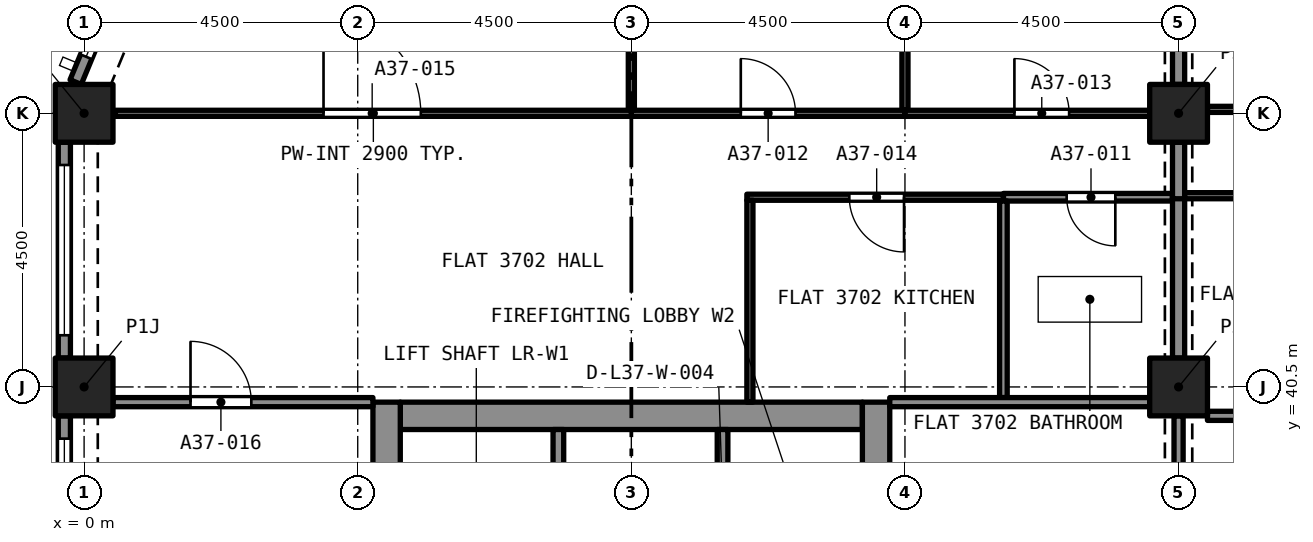
"""IFC4 building model, lengths in metres.
Left out: names, types, materials, properties, quantities, classifications, styles, units other than length and angle.
Written with IfcOpenShell. Run it as: python <this file> out.ifc"""

import sys

from ifc_helpers import new_model, si_unit, direction, frame, frame_2d, origin, origin_2d, place, context, subcontext, project, spatial, rectangle, extrude, element, fill, save


model = new_model("IFC4")
c1 = context("Model", 3, precision=1e-05, world=origin(), true_north=direction((0.0, 1.0)))
c2 = subcontext(c1, "Body", "Model", "MODEL_VIEW")
j1 = project(units=[si_unit("LENGTHUNIT", "METRE"), si_unit("PLANEANGLEUNIT", "RADIAN")], contexts=[c1])
p1 = place(None, origin())
s1 = spatial("IfcSite", under=j1, at=p1, CompositionType="ELEMENT")
p2 = place(p1, origin())
s2 = spatial("IfcBuilding", under=s1, at=p2, CompositionType="ELEMENT")
p3 = place(p2, frame((0.0, 0.0, 133.4)))
s3 = spatial("IfcBuildingStorey", under=s2, at=p3, CompositionType="ELEMENT", Elevation=133.4)
for number, where, z_axis, x_axis in (
    (1, (0.0, 40.5, 0.0), (0.0, 0.0, 1.0), (1.0, 0.0, 0.0)),
    (2, (18.0, 40.5, 0.0), (0.0, 0.0, 1.0), (1.0, 0.0, 0.0)),
    (3, (0.0, 45.0, 0.0), (0.0, 0.0, 1.0), (1.0, 0.0, 0.0)),
    (4, (18.0, 45.0, 0.0), (0.0, 0.0, 1.0), (1.0, 0.0, 0.0)),
):
    element("IfcColumn", number, at=place(p3, frame(where, z_axis=z_axis, x_axis=x_axis)), inside=s3, PredefinedType="COLUMN", context=c2, shape_type="SweptSolid", body=[
        extrude(rectangle(XDim=0.95, YDim=0.95, at=origin_2d()), origin(), (0.0, 0.0, 1.0), 3.2),
    ])
p4 = place(p3, frame((5.2, 40.025, 0.0), z_axis=(0.0, 0.0, 1.0), x_axis=(1.0, 0.0, 0.0)))
e5 = element("IfcWall", 5, at=p4, inside=s3, PredefinedType="SOLIDWALL", context=c2, shape_type="SweptSolid", body=[
    extrude(rectangle(XDim=7.6, YDim=0.45, at=frame_2d((3.8, 0.0))), origin(), (0.0, 0.0, 1.0), 3.2),
])
p5 = place(p3, frame((4.975, 27.25, 0.0), z_axis=(0.0, 0.0, 1.0), x_axis=(0.0, 1.0, 0.0)))
e6 = element("IfcWall", 6, at=p5, inside=s3, PredefinedType="SOLIDWALL", context=c2, shape_type="SweptSolid", body=[
    extrude(rectangle(XDim=13.0, YDim=0.45, at=frame_2d((6.5, 0.0))), origin(), (0.0, 0.0, 1.0), 3.2),
])
p6 = place(p5, frame((8.7, 0.0, 0.0)))
e7 = element("IfcOpeningElement", 7, at=p6, cuts=e6, PredefinedType="OPENING", context=c2, shape_type="SweptSolid", body=[
    extrude(rectangle(XDim=1.2, YDim=2.1, at=frame_2d((0.6, 1.05))), frame((0.0, 0.235, 0.0), z_axis=(0.0, -1.0, 0.0), x_axis=(1.0, 0.0, 0.0)), (0.0, 0.0, 1.0), 0.47),
])
p7 = place(p3, frame((13.025, 27.25, 0.0), z_axis=(0.0, 0.0, 1.0), x_axis=(0.0, 1.0, 0.0)))
e8 = element("IfcWall", 8, at=p7, inside=s3, PredefinedType="SOLIDWALL", context=c2, shape_type="SweptSolid", body=[
    extrude(rectangle(XDim=13.0, YDim=0.45, at=frame_2d((6.5, 0.0))), origin(), (0.0, 0.0, 1.0), 3.2),
])
p8 = place(p7, frame((10.85, 0.0, 0.0)))
e9 = element("IfcOpeningElement", 9, at=p8, cuts=e8, PredefinedType="OPENING", context=c2, shape_type="SweptSolid", body=[
    extrude(rectangle(XDim=1.1, YDim=2.1, at=frame_2d((0.55, 1.05))), frame((0.0, 0.235, 0.0), z_axis=(0.0, -1.0, 0.0), x_axis=(1.0, 0.0, 0.0)), (0.0, 0.0, 1.0), 0.47),
])
p9 = place(p7, frame((8.7, 0.0, 0.0)))
e10 = element("IfcOpeningElement", 10, at=p9, cuts=e8, PredefinedType="OPENING", context=c2, shape_type="SweptSolid", body=[
    extrude(rectangle(XDim=1.2, YDim=2.1, at=frame_2d((0.6, 1.05))), frame((0.0, 0.235, 0.0), z_axis=(0.0, -1.0, 0.0), x_axis=(1.0, 0.0, 0.0)), (0.0, 0.0, 1.0), 0.47),
])
p10 = place(p3, frame((-0.139, 45.513, 0.0), z_axis=(0.0, 0.0, 1.0), x_axis=(0.382680855588, 0.923880599843, 0.0)))
e11 = element("IfcWall", 11, at=p10, inside=s3, PredefinedType="SOLIDWALL", context=c2, shape_type="SweptSolid", body=[
    extrude(rectangle(XDim=2.403, YDim=0.2, at=frame_2d((1.201, 0.0))), origin(), (0.0, 0.0, 1.0), 3.2),
])
p11 = place(p10, frame((0.451, 0.0, 0.45)))
e12 = element("IfcOpeningElement", 12, at=p11, cuts=e11, PredefinedType="OPENING", context=c2, shape_type="SweptSolid", body=[
    extrude(rectangle(XDim=1.7, YDim=1.95, at=frame_2d((0.85, 0.975))), frame((0.0, 0.11, 0.0), z_axis=(0.0, -1.0, 0.0), x_axis=(1.0, 0.0, 0.0)), (0.0, 0.0, 1.0), 0.22),
])
p12 = place(p3, frame((-0.325, 40.975, 0.0), z_axis=(0.0, 0.0, 1.0), x_axis=(0.0, 1.0, 0.0)))
e13 = element("IfcWall", 13, at=p12, inside=s3, PredefinedType="SOLIDWALL", context=c2, shape_type="SweptSolid", body=[
    extrude(rectangle(XDim=3.55, YDim=0.2, at=frame_2d((1.775, 0.0))), origin(), (0.0, 0.0, 1.0), 3.2),
])
p13 = place(p12, frame((0.375, 0.0, 0.45)))
e14 = element("IfcOpeningElement", 14, at=p13, cuts=e13, PredefinedType="OPENING", context=c2, shape_type="SweptSolid", body=[
    extrude(rectangle(XDim=2.8, YDim=1.95, at=frame_2d((1.4, 0.975))), frame((0.0, 0.11, 0.0), z_axis=(0.0, -1.0, 0.0), x_axis=(1.0, 0.0, 0.0)), (0.0, 0.0, 1.0), 0.22),
])
p14 = place(p3, frame((-0.325, 36.475, 0.0), z_axis=(0.0, 0.0, 1.0), x_axis=(0.0, 1.0, 0.0)))
e15 = element("IfcWall", 15, at=p14, inside=s3, PredefinedType="SOLIDWALL", context=c2, shape_type="SweptSolid", body=[
    extrude(rectangle(XDim=3.55, YDim=0.2, at=frame_2d((1.775, 0.0))), origin(), (0.0, 0.0, 1.0), 3.2),
])
p15 = place(p14, frame((0.375, 0.0, 0.45)))
e16 = element("IfcOpeningElement", 16, at=p15, cuts=e15, PredefinedType="OPENING", context=c2, shape_type="SweptSolid", body=[
    extrude(rectangle(XDim=2.8, YDim=1.95, at=frame_2d((1.4, 0.975))), frame((0.0, 0.11, 0.0), z_axis=(0.0, -1.0, 0.0), x_axis=(1.0, 0.0, 0.0)), (0.0, 0.0, 1.0), 0.22),
])
p16 = place(p3, frame((17.9, 43.62, 0.0), z_axis=(0.0, 0.0, 1.0), x_axis=(-1.0, 0.0, 0.0)))
e17 = element("IfcWall", 17, at=p16, inside=s3, PredefinedType="PARTITIONING", context=c2, shape_type="SweptSolid", body=[
    extrude(rectangle(XDim=2.781, YDim=0.125, at=frame_2d((1.39, 0.0))), origin(), (0.0, 0.0, 1.0), 2.9),
])
p17 = place(p16, frame((0.94, 0.0, 0.0)))
e18 = element("IfcOpeningElement", 18, at=p17, cuts=e17, PredefinedType="OPENING", context=c2, shape_type="SweptSolid", body=[
    extrude(rectangle(XDim=0.8, YDim=2.1, at=frame_2d((0.4, 1.05))), frame((0.0, 0.073, 0.0), z_axis=(0.0, -1.0, 0.0), x_axis=(1.0, 0.0, 0.0)), (0.0, 0.0, 1.0), 0.145),
])
p18 = place(p3, frame((15.119, 40.325, 0.0), z_axis=(0.0, 0.0, 1.0), x_axis=(0.0, 1.0, 0.0)))
e19 = element("IfcWall", 19, at=p18, inside=s3, PredefinedType="PARTITIONING", context=c2, shape_type="SweptSolid", body=[
    extrude(rectangle(XDim=3.233, YDim=0.125, at=frame_2d((1.616, 0.0))), origin(), (0.0, 0.0, 1.0), 2.9),
])
p19 = place(p3, frame((18.0, 40.975, 0.0), z_axis=(0.0, 0.0, 1.0), x_axis=(0.0, 1.0, 0.0)))
e20 = element("IfcWall", 20, at=p19, inside=s3, PredefinedType="PARTITIONING", context=c2, shape_type="SweptSolid", body=[
    extrude(rectangle(XDim=2.708, YDim=0.2, at=frame_2d((1.354, 0.0))), origin(), (0.0, 0.0, 1.0), 2.38),
])
p20 = place(p3, frame((13.5, 45.05, 0.0), z_axis=(0.0, 0.0, 1.0), x_axis=(0.0, 1.0, 0.0)))
e21 = element("IfcWall", 21, at=p20, inside=s3, PredefinedType="PARTITIONING", context=c2, shape_type="SweptSolid", body=[
    extrude(rectangle(XDim=3.975, YDim=0.1, at=frame_2d((1.987, 0.0))), origin(), (0.0, 0.0, 1.0), 2.9),
])
p21 = place(p3, frame((9.0, 45.0, 0.0), z_axis=(0.0, 0.0, 1.0), x_axis=(1.0, 0.0, 0.0)))
e22 = element("IfcWall", 22, at=p21, inside=s3, PredefinedType="PARTITIONING", context=c2, shape_type="SweptSolid", body=[
    extrude(rectangle(XDim=4.5, YDim=0.1, at=frame_2d((2.25, 0.0))), origin(), (0.0, 0.0, 1.0), 2.9),
])
p22 = place(p21, frame((1.8, 0.0, 0.0)))
e23 = element("IfcOpeningElement", 23, at=p22, cuts=e22, PredefinedType="OPENING", context=c2, shape_type="SweptSolid", body=[
    extrude(rectangle(XDim=0.9, YDim=2.1, at=frame_2d((0.45, 1.05))), frame((0.0, 0.06, 0.0), z_axis=(0.0, -1.0, 0.0), x_axis=(1.0, 0.0, 0.0)), (0.0, 0.0, 1.0), 0.12),
])
p23 = place(p3, frame((9.0, 45.05, 0.0), z_axis=(0.0, 0.0, 1.0), x_axis=(0.0, 1.0, 0.0)))
e24 = element("IfcWall", 24, at=p23, inside=s3, PredefinedType="PARTITIONING", context=c2, shape_type="SweptSolid", body=[
    extrude(rectangle(XDim=3.975, YDim=0.1, at=frame_2d((1.987, 0.0))), origin(), (0.0, 0.0, 1.0), 2.9),
])
p24 = place(p3, frame((13.5, 45.0, 0.0), z_axis=(0.0, 0.0, 1.0), x_axis=(1.0, 0.0, 0.0)))
e25 = element("IfcWall", 25, at=p24, inside=s3, PredefinedType="PARTITIONING", context=c2, shape_type="SweptSolid", body=[
    extrude(rectangle(XDim=4.025, YDim=0.1, at=frame_2d((2.012, 0.0))), origin(), (0.0, 0.0, 1.0), 2.9),
])
p25 = place(p24, frame((1.8, 0.0, 0.0)))
e26 = element("IfcOpeningElement", 26, at=p25, cuts=e25, PredefinedType="OPENING", context=c2, shape_type="SweptSolid", body=[
    extrude(rectangle(XDim=0.9, YDim=2.1, at=frame_2d((0.45, 1.05))), frame((0.0, 0.06, 0.0), z_axis=(0.0, -1.0, 0.0), x_axis=(1.0, 0.0, 0.0)), (0.0, 0.0, 1.0), 0.12),
])
p26 = place(p3, frame((18.0, 45.475, 0.0), z_axis=(0.0, 0.0, 1.0), x_axis=(0.0, 1.0, 0.0)))
e27 = element("IfcWall", 27, at=p26, inside=s3, PredefinedType="PARTITIONING", context=c2, shape_type="SweptSolid", body=[
    extrude(rectangle(XDim=3.55, YDim=0.2, at=frame_2d((1.775, 0.0))), origin(), (0.0, 0.0, 1.0), 2.38),
])
p27 = place(p3, frame((15.119, 43.62, 0.0), z_axis=(0.0, 0.0, 1.0), x_axis=(-1.0, 0.0, 0.0)))
e28 = element("IfcWall", 28, at=p27, inside=s3, PredefinedType="PARTITIONING", context=c2, shape_type="SweptSolid", body=[
    extrude(rectangle(XDim=4.219, YDim=0.1, at=frame_2d((2.11, 0.0))), origin(), (0.0, 0.0, 1.0), 2.9),
])
p28 = place(p27, frame((1.635, 0.0, 0.0)))
e29 = element("IfcOpeningElement", 29, at=p28, cuts=e28, PredefinedType="OPENING", context=c2, shape_type="SweptSolid", body=[
    extrude(rectangle(XDim=0.9, YDim=2.1, at=frame_2d((0.45, 1.05))), frame((0.0, 0.06, 0.0), z_axis=(0.0, -1.0, 0.0), x_axis=(1.0, 0.0, 0.0)), (0.0, 0.0, 1.0), 0.12),
])
p29 = place(p3, frame((10.95, 40.25, 0.0), z_axis=(0.0, 0.0, 1.0), x_axis=(0.0, 1.0, 0.0)))
e30 = element("IfcWall", 30, at=p29, inside=s3, PredefinedType="PARTITIONING", context=c2, shape_type="SweptSolid", body=[
    extrude(rectangle(XDim=3.32, YDim=0.1, at=frame_2d((1.66, 0.0))), origin(), (0.0, 0.0, 1.0), 2.9),
])
p30 = place(p3, frame((0.514, 45.0, 0.0), z_axis=(0.0, 0.0, 1.0), x_axis=(1.0, 0.0, 0.0)))
e31 = element("IfcWall", 31, at=p30, inside=s3, PredefinedType="PARTITIONING", context=c2, shape_type="SweptSolid", body=[
    extrude(rectangle(XDim=8.486, YDim=0.1, at=frame_2d((4.243, 0.0))), origin(), (0.0, 0.0, 1.0), 2.9),
])
p31 = place(p30, frame((3.423, 0.0, 0.0)))
e32 = element("IfcOpeningElement", 32, at=p31, cuts=e31, PredefinedType="OPENING", context=c2, shape_type="SweptSolid", body=[
    extrude(rectangle(XDim=1.6, YDim=2.1, at=frame_2d((0.8, 1.05))), frame((0.0, 0.06, 0.0), z_axis=(0.0, -1.0, 0.0), x_axis=(1.0, 0.0, 0.0)), (0.0, 0.0, 1.0), 0.12),
])
p32 = place(p3, frame((18.0, 43.595, 0.0), z_axis=(0.0, 0.0, 1.0), x_axis=(0.0, 1.0, 0.0)))
e33 = element("IfcWall", 33, at=p32, inside=s3, PredefinedType="PARTITIONING", context=c2, shape_type="SweptSolid", body=[
    extrude(rectangle(XDim=0.93, YDim=0.2, at=frame_2d((0.465, 0.0))), origin(), (0.0, 0.0, 1.0), 2.38),
])
p33 = place(p3, frame((0.475, 40.25, 0.0), z_axis=(0.0, 0.0, 1.0), x_axis=(1.0, 0.0, 0.0)))
e34 = element("IfcWall", 34, at=p33, inside=s3, PredefinedType="PARTITIONING", context=c2, shape_type="SweptSolid", body=[
    extrude(rectangle(XDim=4.275, YDim=0.15, at=frame_2d((2.137, 0.0))), origin(), (0.0, 0.0, 1.0), 2.9),
])
p34 = place(p33, frame((1.275, 0.0, 0.0)))
e35 = element("IfcOpeningElement", 35, at=p34, cuts=e34, PredefinedType="OPENING", context=c2, shape_type="SweptSolid", body=[
    extrude(rectangle(XDim=1.0, YDim=2.1, at=frame_2d((0.5, 1.05))), frame((0.0, 0.085, 0.0), z_axis=(0.0, -1.0, 0.0), x_axis=(1.0, 0.0, 0.0)), (0.0, 0.0, 1.0), 0.17),
])
p35 = place(p3, frame((13.25, 40.25, 0.0), z_axis=(0.0, 0.0, 1.0), x_axis=(1.0, 0.0, 0.0)))
e36 = element("IfcWall", 36, at=p35, inside=s3, PredefinedType="PARTITIONING", context=c2, shape_type="SweptSolid", body=[
    extrude(rectangle(XDim=4.275, YDim=0.15, at=frame_2d((2.137, 0.0))), origin(), (0.0, 0.0, 1.0), 2.9),
])
p36 = place(p3, frame((21.24, 43.645, 0.0), z_axis=(0.0, 0.0, 1.0), x_axis=(-1.0, 0.0, 0.0)))
e37 = element("IfcWall", 37, at=p36, inside=s3, PredefinedType="PARTITIONING", context=c2, shape_type="SweptSolid", body=[
    extrude(rectangle(XDim=3.14, YDim=0.1, at=frame_2d((1.57, 0.0))), origin(), (0.0, 0.0, 1.0), 2.75),
])
p37 = place(p36, frame((1.17, 0.0, 0.0)))
e38 = element("IfcOpeningElement", 38, at=p37, cuts=e37, PredefinedType="OPENING", context=c2, shape_type="SweptSolid", body=[
    extrude(rectangle(XDim=0.9, YDim=2.1, at=frame_2d((0.45, 1.05))), frame((0.0, 0.06, 0.0), z_axis=(0.0, -1.0, 0.0), x_axis=(1.0, 0.0, 0.0)), (0.0, 0.0, 1.0), 0.12),
])
p38 = place(p3, frame((18.475, 45.065, 0.0), z_axis=(0.0, 0.0, 1.0), x_axis=(1.0, 0.0, 0.0)))
e39 = element("IfcWall", 39, at=p38, inside=s3, PredefinedType="PARTITIONING", context=c2, shape_type="SweptSolid", body=[
    extrude(rectangle(XDim=4.025, YDim=0.1, at=frame_2d((2.012, 0.0))), origin(), (0.0, 0.0, 1.0), 2.75),
])
p39 = place(p38, frame((1.275, 0.0, 0.0)))
e40 = element("IfcOpeningElement", 40, at=p39, cuts=e39, PredefinedType="OPENING", context=c2, shape_type="SweptSolid", body=[
    extrude(rectangle(XDim=1.0, YDim=2.1, at=frame_2d((0.5, 1.05))), frame((0.0, 0.06, 0.0), z_axis=(0.0, -1.0, 0.0), x_axis=(1.0, 0.0, 0.0)), (0.0, 0.0, 1.0), 0.12),
])
p40 = place(p3, frame((18.475, 40.025, 0.0), z_axis=(0.0, 0.0, 1.0), x_axis=(1.0, 0.0, 0.0)))
e41 = element("IfcWall", 41, at=p40, inside=s3, PredefinedType="PARTITIONING", context=c2, shape_type="SweptSolid", body=[
    extrude(rectangle(XDim=9.05, YDim=0.15, at=frame_2d((4.525, 0.0))), origin(), (0.0, 0.0, 1.0), 2.75),
])
p41 = place(p3, frame((18.0, 40.025, 0.0), z_axis=(0.0, 0.0, 1.0), x_axis=(0.0, -1.0, 0.0)))
e42 = element("IfcWall", 42, at=p41, inside=s3, PredefinedType="PARTITIONING", context=c2, shape_type="SweptSolid", body=[
    extrude(rectangle(XDim=3.55, YDim=0.15, at=frame_2d((1.775, 0.0))), origin(), (0.0, 0.0, 1.0), 2.38),
])
p42 = place(p41, frame((1.175, 0.0, 0.0)))
e43 = element("IfcOpeningElement", 43, at=p42, cuts=e42, PredefinedType="OPENING", context=c2, shape_type="SweptSolid", body=[
    extrude(rectangle(XDim=1.2, YDim=2.1, at=frame_2d((0.6, 1.05))), frame((0.0, 0.085, 0.0), z_axis=(0.0, -1.0, 0.0), x_axis=(1.0, 0.0, 0.0)), (0.0, 0.0, 1.0), 0.17),
])
p43 = place(p3, frame((7.8, 37.5, 0.0), z_axis=(0.0, 0.0, 1.0), x_axis=(0.0, 1.0, 0.0)))
e44 = element("IfcWall", 44, at=p43, inside=s3, PredefinedType="SOLIDWALL", context=c2, shape_type="SweptSolid", body=[
    extrude(rectangle(XDim=2.3, YDim=0.175, at=frame_2d((1.15, 0.0))), origin(), (0.0, 0.0, 1.0), 2.9),
])
p44 = place(p3, frame((10.5, 37.5, 0.0), z_axis=(0.0, 0.0, 1.0), x_axis=(0.0, 1.0, 0.0)))
e45 = element("IfcWall", 45, at=p44, inside=s3, PredefinedType="SOLIDWALL", context=c2, shape_type="SweptSolid", body=[
    extrude(rectangle(XDim=2.3, YDim=0.175, at=frame_2d((1.15, 0.0))), origin(), (0.0, 0.0, 1.0), 2.9),
])
p45 = place(p44, frame((0.65, 0.0, 0.0)))
e46 = element("IfcOpeningElement", 46, at=p45, cuts=e45, PredefinedType="OPENING", context=c2, shape_type="SweptSolid", body=[
    extrude(rectangle(XDim=1.0, YDim=2.1, at=frame_2d((0.5, 1.05))), frame((0.0, 0.097, 0.0), z_axis=(0.0, -1.0, 0.0), x_axis=(1.0, 0.0, 0.0)), (0.0, 0.0, 1.0), 0.195),
])
p46 = place(p11, origin())
e47 = element("IfcWindow", 47, at=p46, inside=s3, PartitioningType="SINGLE_PANEL", PredefinedType="WINDOW", context=c2, shape_type="SweptSolid", body=[
    extrude(rectangle(XDim=1.7, YDim=1.95, at=frame_2d((0.85, 0.975))), frame((0.0, 0.03, 0.0), z_axis=(0.0, -1.0, 0.0), x_axis=(1.0, 0.0, 0.0)), (0.0, 0.0, 1.0), 0.06),
])
fill(e12, e47)
p47 = place(p13, origin())
e48 = element("IfcWindow", 48, at=p47, inside=s3, PartitioningType="SINGLE_PANEL", PredefinedType="WINDOW", context=c2, shape_type="SweptSolid", body=[
    extrude(rectangle(XDim=2.8, YDim=1.95, at=frame_2d((1.4, 0.975))), frame((0.0, 0.03, 0.0), z_axis=(0.0, -1.0, 0.0), x_axis=(1.0, 0.0, 0.0)), (0.0, 0.0, 1.0), 0.06),
])
fill(e14, e48)
p48 = place(p15, origin())
e49 = element("IfcWindow", 49, at=p48, inside=s3, PartitioningType="SINGLE_PANEL", PredefinedType="WINDOW", context=c2, shape_type="SweptSolid", body=[
    extrude(rectangle(XDim=2.8, YDim=1.95, at=frame_2d((1.4, 0.975))), frame((0.0, 0.03, 0.0), z_axis=(0.0, -1.0, 0.0), x_axis=(1.0, 0.0, 0.0)), (0.0, 0.0, 1.0), 0.06),
])
fill(e16, e49)
p49 = place(p17, origin())
e50 = element("IfcDoor", 50, at=p49, inside=s3, OperationType="SINGLE_SWING_LEFT", PredefinedType="DOOR", context=c2, shape_type="SweptSolid", body=[
    extrude(rectangle(XDim=0.8, YDim=2.1, at=frame_2d((0.4, 1.05))), frame((0.0, 0.025, 0.0), z_axis=(0.0, -1.0, 0.0), x_axis=(1.0, 0.0, 0.0)), (0.0, 0.0, 1.0), 0.05),
])
fill(e18, e50)
p50 = place(p22, origin())
e51 = element("IfcDoor", 51, at=p50, inside=s3, OperationType="SINGLE_SWING_LEFT", PredefinedType="DOOR", context=c2, shape_type="SweptSolid", body=[
    extrude(rectangle(XDim=0.9, YDim=2.1, at=frame_2d((0.45, 1.05))), frame((0.0, 0.025, 0.0), z_axis=(0.0, -1.0, 0.0), x_axis=(1.0, 0.0, 0.0)), (0.0, 0.0, 1.0), 0.05),
])
fill(e23, e51)
p51 = place(p25, origin())
e52 = element("IfcDoor", 52, at=p51, inside=s3, OperationType="SINGLE_SWING_RIGHT", PredefinedType="DOOR", context=c2, shape_type="SweptSolid", body=[
    extrude(rectangle(XDim=0.9, YDim=2.1, at=frame_2d((0.45, 1.05))), frame((0.0, 0.025, 0.0), z_axis=(0.0, -1.0, 0.0), x_axis=(1.0, 0.0, 0.0)), (0.0, 0.0, 1.0), 0.05),
])
fill(e26, e52)
p52 = place(p28, origin())
e53 = element("IfcDoor", 53, at=p52, inside=s3, OperationType="SINGLE_SWING_LEFT", PredefinedType="DOOR", context=c2, shape_type="SweptSolid", body=[
    extrude(rectangle(XDim=0.9, YDim=2.1, at=frame_2d((0.45, 1.05))), frame((0.0, 0.025, 0.0), z_axis=(0.0, -1.0, 0.0), x_axis=(1.0, 0.0, 0.0)), (0.0, 0.0, 1.0), 0.05),
])
fill(e29, e53)
p53 = place(p31, origin())
e54 = element("IfcDoor", 54, at=p53, inside=s3, OperationType="SINGLE_SWING_LEFT", PredefinedType="DOOR", context=c2, shape_type="SweptSolid", body=[
    extrude(rectangle(XDim=1.6, YDim=2.1, at=frame_2d((0.8, 1.05))), frame((0.0, 0.025, 0.0), z_axis=(0.0, -1.0, 0.0), x_axis=(1.0, 0.0, 0.0)), (0.0, 0.0, 1.0), 0.05),
])
fill(e32, e54)
p54 = place(p34, origin())
e55 = element("IfcDoor", 55, at=p54, inside=s3, OperationType="SINGLE_SWING_LEFT", PredefinedType="DOOR", context=c2, shape_type="SweptSolid", body=[
    extrude(rectangle(XDim=1.0, YDim=2.1, at=frame_2d((0.5, 1.05))), frame((0.0, 0.025, 0.0), z_axis=(0.0, -1.0, 0.0), x_axis=(1.0, 0.0, 0.0)), (0.0, 0.0, 1.0), 0.05),
])
fill(e35, e55)
save(model, sys.argv[1])
